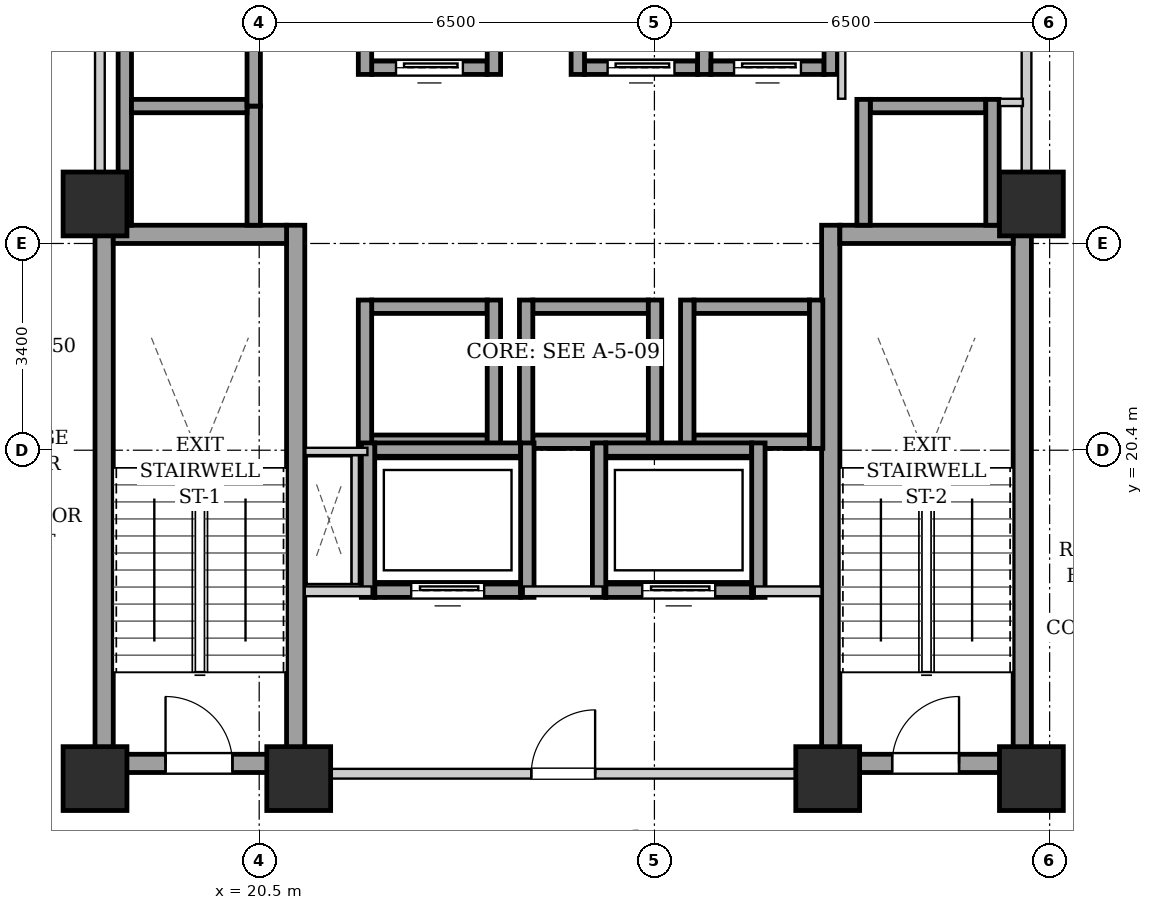
"""IFC4 building model, lengths in metres.
Left out: names, types, materials, properties, quantities, classifications, styles, units other than length and angle.
Written with IfcOpenShell. Run it as: python <this file> out.ifc"""

import sys

from ifc_helpers import new_model, si_unit, direction, frame, frame_2d, origin, origin_2d, place, context, subcontext, project, spatial, rectangle, extrude, element, fill, save


model = new_model("IFC4")
c1 = context("Model", 3, precision=1e-05, world=origin(), true_north=direction((0.0, 1.0)))
c2 = subcontext(c1, "Body", "Model", "MODEL_VIEW")
j1 = project(units=[si_unit("LENGTHUNIT", "METRE"), si_unit("PLANEANGLEUNIT", "RADIAN")], contexts=[c1])
p1 = place(None, origin())
s1 = spatial("IfcSite", under=j1, at=p1, CompositionType="ELEMENT")
p2 = place(p1, origin())
s2 = spatial("IfcBuilding", under=s1, at=p2, CompositionType="ELEMENT")
p3 = place(p2, frame((0.0, 0.0, 119.9)))
s3 = spatial("IfcBuildingStorey", under=s2, at=p3, CompositionType="ELEMENT", Elevation=119.9)
for number, where, z_axis, x_axis in (
    (1, (17.8, 15.0, 0.0), (0.0, 0.0, 1.0), (1.0, 0.0, 0.0)),
    (2, (21.15, 15.0, 0.0), (0.0, 0.0, 1.0), (1.0, 0.0, 0.0)),
    (3, (29.85, 15.0, 0.0), (0.0, 0.0, 1.0), (1.0, 0.0, 0.0)),
    (4, (33.2, 15.0, 0.0), (0.0, 0.0, 1.0), (1.0, 0.0, 0.0)),
    (5, (17.8, 24.45, 0.0), (0.0, 0.0, 1.0), (1.0, 0.0, 0.0)),
    (6, (33.2, 24.45, 0.0), (0.0, 0.0, 1.0), (1.0, 0.0, 0.0)),
):
    element("IfcColumn", number, at=place(p3, frame(where, z_axis=z_axis, x_axis=x_axis)), inside=s3, PredefinedType="COLUMN", context=c2, shape_type="SweptSolid", body=[
        extrude(rectangle(XDim=1.05, YDim=1.05, at=origin_2d()), origin(), (0.0, 0.0, 1.0), 4.5),
    ])
for number, where, z_axis, x_axis in (
    (7, (17.95, 15.1, 0.0), (0.0, 0.0, 1.0), (0.0, 1.0, 0.0)),
    (8, (21.1, 15.1, 0.0), (0.0, 0.0, 1.0), (0.0, 1.0, 0.0)),
):
    element("IfcWall", number, at=place(p3, frame(where, z_axis=z_axis, x_axis=x_axis)), inside=s3, PredefinedType="SHEAR", context=c2, shape_type="SweptSolid", body=[
        extrude(rectangle(XDim=9.0, YDim=0.3, at=frame_2d((4.5, 0.0))), origin(), (0.0, 0.0, 1.0), 4.18),
    ])
p4 = place(p3, frame((18.1, 23.95, 0.0), z_axis=(0.0, 0.0, 1.0), x_axis=(1.0, 0.0, 0.0)))
e9 = element("IfcWall", 9, at=p4, inside=s3, PredefinedType="SHEAR", context=c2, shape_type="SweptSolid", body=[
    extrude(rectangle(XDim=2.85, YDim=0.3, at=frame_2d((1.425, 0.0))), origin(), (0.0, 0.0, 1.0), 4.18),
])
p5 = place(p3, frame((18.1, 15.25, 0.0), z_axis=(0.0, 0.0, 1.0), x_axis=(1.0, 0.0, 0.0)))
e10 = element("IfcWall", 10, at=p5, inside=s3, PredefinedType="SHEAR", context=c2, shape_type="SweptSolid", body=[
    extrude(rectangle(XDim=2.85, YDim=0.3, at=frame_2d((1.425, 0.0))), origin(), (0.0, 0.0, 1.0), 4.18),
])
p6 = place(p5, frame((0.86, 0.0, 0.0)))
e11 = element("IfcOpeningElement", 11, at=p6, cuts=e10, PredefinedType="OPENING", context=c2, shape_type="SweptSolid", body=[
    extrude(rectangle(XDim=1.1, YDim=2.05, at=frame_2d((0.55, 1.025))), frame((0.0, 0.16, 0.0), z_axis=(0.0, -1.0, 0.0), x_axis=(1.0, 0.0, 0.0)), (0.0, 0.0, 1.0), 0.32),
])
for number, where, z_axis, x_axis in (
    (12, (29.9, 15.1, 0.0), (0.0, 0.0, 1.0), (0.0, 1.0, 0.0)),
    (13, (33.05, 15.1, 0.0), (0.0, 0.0, 1.0), (0.0, 1.0, 0.0)),
):
    element("IfcWall", number, at=place(p3, frame(where, z_axis=z_axis, x_axis=x_axis)), inside=s3, PredefinedType="SHEAR", context=c2, shape_type="SweptSolid", body=[
        extrude(rectangle(XDim=9.0, YDim=0.3, at=frame_2d((4.5, 0.0))), origin(), (0.0, 0.0, 1.0), 4.18),
    ])
p7 = place(p3, frame((30.05, 23.95, 0.0), z_axis=(0.0, 0.0, 1.0), x_axis=(1.0, 0.0, 0.0)))
e14 = element("IfcWall", 14, at=p7, inside=s3, PredefinedType="SHEAR", context=c2, shape_type="SweptSolid", body=[
    extrude(rectangle(XDim=2.85, YDim=0.3, at=frame_2d((1.425, 0.0))), origin(), (0.0, 0.0, 1.0), 4.18),
])
p8 = place(p3, frame((30.05, 15.25, 0.0), z_axis=(0.0, 0.0, 1.0), x_axis=(1.0, 0.0, 0.0)))
e15 = element("IfcWall", 15, at=p8, inside=s3, PredefinedType="SHEAR", context=c2, shape_type="SweptSolid", body=[
    extrude(rectangle(XDim=2.85, YDim=0.3, at=frame_2d((1.425, 0.0))), origin(), (0.0, 0.0, 1.0), 4.18),
])
p9 = place(p8, frame((0.86, 0.0, 0.0)))
e16 = element("IfcOpeningElement", 16, at=p9, cuts=e15, PredefinedType="OPENING", context=c2, shape_type="SweptSolid", body=[
    extrude(rectangle(XDim=1.1, YDim=2.05, at=frame_2d((0.55, 1.025))), frame((0.0, 0.16, 0.0), z_axis=(0.0, -1.0, 0.0), x_axis=(1.0, 0.0, 0.0)), (0.0, 0.0, 1.0), 0.32),
])
p10 = place(p3, frame((22.35, 26.69, 0.0), z_axis=(0.0, 0.0, 1.0), x_axis=(1.0, 0.0, 0.0)))
e17 = element("IfcWall", 17, at=p10, inside=s3, PredefinedType="SHEAR", context=c2, shape_type="SweptSolid", body=[
    extrude(rectangle(XDim=1.9, YDim=0.22, at=frame_2d((0.95, 0.0))), origin(), (0.0, 0.0, 1.0), 4.18),
])
p11 = place(p10, frame((0.4, 0.0, 0.0)))
e18 = element("IfcOpeningElement", 18, at=p11, cuts=e17, PredefinedType="OPENING", context=c2, shape_type="SweptSolid", body=[
    extrude(rectangle(XDim=1.1, YDim=2.15, at=frame_2d((0.55, 1.075))), frame((0.0, 0.12, 0.0), z_axis=(0.0, -1.0, 0.0), x_axis=(1.0, 0.0, 0.0)), (0.0, 0.0, 1.0), 0.24),
])
for number, where, z_axis, x_axis in (
    (19, (22.24, 26.58, 0.0), (0.0, 0.0, 1.0), (0.0, 1.0, 0.0)),
    (20, (24.36, 26.58, 0.0), (0.0, 0.0, 1.0), (0.0, 1.0, 0.0)),
):
    element("IfcWall", number, at=place(p3, frame(where, z_axis=z_axis, x_axis=x_axis)), inside=s3, PredefinedType="SHEAR", context=c2, shape_type="SweptSolid", body=[
        extrude(rectangle(XDim=2.44, YDim=0.22, at=frame_2d((1.22, 0.0))), origin(), (0.0, 0.0, 1.0), 4.18),
    ])
p12 = place(p3, frame((25.85, 26.69, 0.0), z_axis=(0.0, 0.0, 1.0), x_axis=(1.0, 0.0, 0.0)))
e21 = element("IfcWall", 21, at=p12, inside=s3, PredefinedType="SHEAR", context=c2, shape_type="SweptSolid", body=[
    extrude(rectangle(XDim=1.86, YDim=0.22, at=frame_2d((0.93, 0.0))), origin(), (0.0, 0.0, 1.0), 4.18),
])
p13 = place(p12, frame((0.38, 0.0, 0.0)))
e22 = element("IfcOpeningElement", 22, at=p13, cuts=e21, PredefinedType="OPENING", context=c2, shape_type="SweptSolid", body=[
    extrude(rectangle(XDim=1.1, YDim=2.15, at=frame_2d((0.55, 1.075))), frame((0.0, 0.12, 0.0), z_axis=(0.0, -1.0, 0.0), x_axis=(1.0, 0.0, 0.0)), (0.0, 0.0, 1.0), 0.24),
])
for number, where, z_axis, x_axis in (
    (23, (25.74, 26.58, 0.0), (0.0, 0.0, 1.0), (0.0, 1.0, 0.0)),
    (24, (27.82, 26.58, 0.0), (0.0, 0.0, 1.0), (0.0, 1.0, 0.0)),
):
    element("IfcWall", number, at=place(p3, frame(where, z_axis=z_axis, x_axis=x_axis)), inside=s3, PredefinedType="SHEAR", context=c2, shape_type="SweptSolid", body=[
        extrude(rectangle(XDim=2.44, YDim=0.22, at=frame_2d((1.22, 0.0))), origin(), (0.0, 0.0, 1.0), 4.18),
    ])
p14 = place(p3, frame((27.93, 26.69, 0.0), z_axis=(0.0, 0.0, 1.0), x_axis=(1.0, 0.0, 0.0)))
e25 = element("IfcWall", 25, at=p14, inside=s3, PredefinedType="SHEAR", context=c2, shape_type="SweptSolid", body=[
    extrude(rectangle(XDim=1.86, YDim=0.22, at=frame_2d((0.93, 0.0))), origin(), (0.0, 0.0, 1.0), 4.18),
])
p15 = place(p14, frame((0.38, 0.0, 0.0)))
e26 = element("IfcOpeningElement", 26, at=p15, cuts=e25, PredefinedType="OPENING", context=c2, shape_type="SweptSolid", body=[
    extrude(rectangle(XDim=1.1, YDim=2.15, at=frame_2d((0.55, 1.075))), frame((0.0, 0.12, 0.0), z_axis=(0.0, -1.0, 0.0), x_axis=(1.0, 0.0, 0.0)), (0.0, 0.0, 1.0), 0.24),
])
p16 = place(p3, frame((29.9, 26.58, 0.0), z_axis=(0.0, 0.0, 1.0), x_axis=(0.0, 1.0, 0.0)))
e27 = element("IfcWall", 27, at=p16, inside=s3, PredefinedType="SHEAR", context=c2, shape_type="SweptSolid", body=[
    extrude(rectangle(XDim=2.44, YDim=0.22, at=frame_2d((1.22, 0.0))), origin(), (0.0, 0.0, 1.0), 4.18),
])
for number, where, z_axis, x_axis in (
    (28, (22.35, 20.54, 0.0), (0.0, 0.0, 1.0), (1.0, 0.0, 0.0)),
    (29, (22.35, 22.76, 0.0), (0.0, 0.0, 1.0), (1.0, 0.0, 0.0)),
):
    element("IfcWall", number, at=place(p3, frame(where, z_axis=z_axis, x_axis=x_axis)), inside=s3, PredefinedType="SHEAR", context=c2, shape_type="SweptSolid", body=[
        extrude(rectangle(XDim=1.9, YDim=0.22, at=frame_2d((0.95, 0.0))), origin(), (0.0, 0.0, 1.0), 4.18),
    ])
for number, where, z_axis, x_axis in (
    (30, (22.24, 20.43, 0.0), (0.0, 0.0, 1.0), (0.0, 1.0, 0.0)),
    (31, (24.36, 20.43, 0.0), (0.0, 0.0, 1.0), (0.0, 1.0, 0.0)),
):
    element("IfcWall", number, at=place(p3, frame(where, z_axis=z_axis, x_axis=x_axis)), inside=s3, PredefinedType="SHEAR", context=c2, shape_type="SweptSolid", body=[
        extrude(rectangle(XDim=2.44, YDim=0.22, at=frame_2d((1.22, 0.0))), origin(), (0.0, 0.0, 1.0), 4.18),
    ])
for number, where, z_axis, x_axis in (
    (32, (25.0, 20.54, 0.0), (0.0, 0.0, 1.0), (1.0, 0.0, 0.0)),
    (33, (25.0, 22.76, 0.0), (0.0, 0.0, 1.0), (1.0, 0.0, 0.0)),
):
    element("IfcWall", number, at=place(p3, frame(where, z_axis=z_axis, x_axis=x_axis)), inside=s3, PredefinedType="SHEAR", context=c2, shape_type="SweptSolid", body=[
        extrude(rectangle(XDim=1.9, YDim=0.22, at=frame_2d((0.95, 0.0))), origin(), (0.0, 0.0, 1.0), 4.18),
    ])
for number, where, z_axis, x_axis in (
    (34, (24.89, 20.43, 0.0), (0.0, 0.0, 1.0), (0.0, 1.0, 0.0)),
    (35, (27.01, 20.43, 0.0), (0.0, 0.0, 1.0), (0.0, 1.0, 0.0)),
):
    element("IfcWall", number, at=place(p3, frame(where, z_axis=z_axis, x_axis=x_axis)), inside=s3, PredefinedType="SHEAR", context=c2, shape_type="SweptSolid", body=[
        extrude(rectangle(XDim=2.44, YDim=0.22, at=frame_2d((1.22, 0.0))), origin(), (0.0, 0.0, 1.0), 4.18),
    ])
for number, where, z_axis, x_axis in (
    (36, (27.65, 20.54, 0.0), (0.0, 0.0, 1.0), (1.0, 0.0, 0.0)),
    (37, (27.65, 22.76, 0.0), (0.0, 0.0, 1.0), (1.0, 0.0, 0.0)),
):
    element("IfcWall", number, at=place(p3, frame(where, z_axis=z_axis, x_axis=x_axis)), inside=s3, PredefinedType="SHEAR", context=c2, shape_type="SweptSolid", body=[
        extrude(rectangle(XDim=1.9, YDim=0.22, at=frame_2d((0.95, 0.0))), origin(), (0.0, 0.0, 1.0), 4.18),
    ])
for number, where, z_axis, x_axis in (
    (38, (27.54, 20.43, 0.0), (0.0, 0.0, 1.0), (0.0, 1.0, 0.0)),
    (39, (29.66, 20.43, 0.0), (0.0, 0.0, 1.0), (0.0, 1.0, 0.0)),
):
    element("IfcWall", number, at=place(p3, frame(where, z_axis=z_axis, x_axis=x_axis)), inside=s3, PredefinedType="SHEAR", context=c2, shape_type="SweptSolid", body=[
        extrude(rectangle(XDim=2.44, YDim=0.22, at=frame_2d((1.22, 0.0))), origin(), (0.0, 0.0, 1.0), 4.18),
    ])
p17 = place(p3, frame((18.29, 24.1, 0.0), z_axis=(0.0, 0.0, 1.0), x_axis=(0.0, 1.0, 0.0)))
e40 = element("IfcWall", 40, at=p17, inside=s3, PredefinedType="SHEAR", context=c2, shape_type="SweptSolid", body=[
    extrude(rectangle(XDim=4.14, YDim=0.22, at=frame_2d((2.07, 0.0))), origin(), (0.0, 0.0, 1.0), 4.18),
])
p18 = place(p3, frame((20.41, 24.1, 0.0), z_axis=(0.0, 0.0, 1.0), x_axis=(0.0, 1.0, 0.0)))
e41 = element("IfcWall", 41, at=p18, inside=s3, PredefinedType="SHEAR", context=c2, shape_type="SweptSolid", body=[
    extrude(rectangle(XDim=1.96, YDim=0.22, at=frame_2d((0.98, 0.0))), origin(), (0.0, 0.0, 1.0), 4.18),
])
p19 = place(p3, frame((18.4, 26.06, 0.0), z_axis=(0.0, 0.0, 1.0), x_axis=(1.0, 0.0, 0.0)))
e42 = element("IfcWall", 42, at=p19, inside=s3, PredefinedType="SHEAR", context=c2, shape_type="SweptSolid", body=[
    extrude(rectangle(XDim=1.9, YDim=0.22, at=frame_2d((0.95, 0.0))), origin(), (0.0, 0.0, 1.0), 4.18),
])
p20 = place(p3, frame((20.41, 26.06, 0.0), z_axis=(0.0, 0.0, 1.0), x_axis=(0.0, 1.0, 0.0)))
e43 = element("IfcWall", 43, at=p20, inside=s3, PredefinedType="SHEAR", context=c2, shape_type="SweptSolid", body=[
    extrude(rectangle(XDim=2.18, YDim=0.22, at=frame_2d((1.09, 0.0))), origin(), (0.0, 0.0, 1.0), 4.18),
])
p21 = place(p3, frame((30.55, 26.06, 0.0), z_axis=(0.0, 0.0, 1.0), x_axis=(1.0, 0.0, 0.0)))
e44 = element("IfcWall", 44, at=p21, inside=s3, PredefinedType="SHEAR", context=c2, shape_type="SweptSolid", body=[
    extrude(rectangle(XDim=1.9, YDim=0.22, at=frame_2d((0.95, 0.0))), origin(), (0.0, 0.0, 1.0), 4.18),
])
for number, where, z_axis, x_axis in (
    (45, (30.44, 24.1, 0.0), (0.0, 0.0, 1.0), (0.0, 1.0, 0.0)),
    (46, (32.56, 24.1, 0.0), (0.0, 0.0, 1.0), (0.0, 1.0, 0.0)),
):
    element("IfcWall", number, at=place(p3, frame(where, z_axis=z_axis, x_axis=x_axis)), inside=s3, PredefinedType="SHEAR", context=c2, shape_type="SweptSolid", body=[
        extrude(rectangle(XDim=2.07, YDim=0.22, at=frame_2d((1.035, 0.0))), origin(), (0.0, 0.0, 1.0), 4.18),
    ])
p22 = place(p3, frame((22.4, 18.09, 0.0), z_axis=(0.0, 0.0, 1.0), x_axis=(1.0, 0.0, 0.0)))
e47 = element("IfcWall", 47, at=p22, inside=s3, PredefinedType="SHEAR", context=c2, shape_type="SweptSolid", body=[
    extrude(rectangle(XDim=2.4, YDim=0.22, at=frame_2d((1.2, 0.0))), origin(), (0.0, 0.0, 1.0), 4.18),
])
p23 = place(p22, frame((0.6, 0.0, 0.0)))
e48 = element("IfcOpeningElement", 48, at=p23, cuts=e47, PredefinedType="OPENING", context=c2, shape_type="SweptSolid", body=[
    extrude(rectangle(XDim=1.2, YDim=2.15, at=frame_2d((0.6, 1.075))), frame((0.0, 0.12, 0.0), z_axis=(0.0, -1.0, 0.0), x_axis=(1.0, 0.0, 0.0)), (0.0, 0.0, 1.0), 0.24),
])
p24 = place(p3, frame((22.4, 20.41, 0.0), z_axis=(0.0, 0.0, 1.0), x_axis=(1.0, 0.0, 0.0)))
e49 = element("IfcWall", 49, at=p24, inside=s3, PredefinedType="SHEAR", context=c2, shape_type="SweptSolid", body=[
    extrude(rectangle(XDim=2.4, YDim=0.22, at=frame_2d((1.2, 0.0))), origin(), (0.0, 0.0, 1.0), 4.18),
])
for number, where, z_axis, x_axis in (
    (50, (22.29, 17.98, 0.0), (0.0, 0.0, 1.0), (0.0, 1.0, 0.0)),
    (51, (24.91, 17.98, 0.0), (0.0, 0.0, 1.0), (0.0, 1.0, 0.0)),
):
    element("IfcWall", number, at=place(p3, frame(where, z_axis=z_axis, x_axis=x_axis)), inside=s3, PredefinedType="SHEAR", context=c2, shape_type="SweptSolid", body=[
        extrude(rectangle(XDim=2.54, YDim=0.22, at=frame_2d((1.27, 0.0))), origin(), (0.0, 0.0, 1.0), 4.18),
    ])
p25 = place(p3, frame((26.2, 18.09, 0.0), z_axis=(0.0, 0.0, 1.0), x_axis=(1.0, 0.0, 0.0)))
e52 = element("IfcWall", 52, at=p25, inside=s3, PredefinedType="SHEAR", context=c2, shape_type="SweptSolid", body=[
    extrude(rectangle(XDim=2.4, YDim=0.22, at=frame_2d((1.2, 0.0))), origin(), (0.0, 0.0, 1.0), 4.18),
])
p26 = place(p25, frame((0.6, 0.0, 0.0)))
e53 = element("IfcOpeningElement", 53, at=p26, cuts=e52, PredefinedType="OPENING", context=c2, shape_type="SweptSolid", body=[
    extrude(rectangle(XDim=1.2, YDim=2.15, at=frame_2d((0.6, 1.075))), frame((0.0, 0.12, 0.0), z_axis=(0.0, -1.0, 0.0), x_axis=(1.0, 0.0, 0.0)), (0.0, 0.0, 1.0), 0.24),
])
p27 = place(p3, frame((26.2, 20.41, 0.0), z_axis=(0.0, 0.0, 1.0), x_axis=(1.0, 0.0, 0.0)))
e54 = element("IfcWall", 54, at=p27, inside=s3, PredefinedType="SHEAR", context=c2, shape_type="SweptSolid", body=[
    extrude(rectangle(XDim=2.4, YDim=0.22, at=frame_2d((1.2, 0.0))), origin(), (0.0, 0.0, 1.0), 4.18),
])
for number, where, z_axis, x_axis in (
    (55, (26.09, 17.98, 0.0), (0.0, 0.0, 1.0), (0.0, 1.0, 0.0)),
    (56, (28.71, 17.98, 0.0), (0.0, 0.0, 1.0), (0.0, 1.0, 0.0)),
):
    element("IfcWall", number, at=place(p3, frame(where, z_axis=z_axis, x_axis=x_axis)), inside=s3, PredefinedType="SHEAR", context=c2, shape_type="SweptSolid", body=[
        extrude(rectangle(XDim=2.54, YDim=0.22, at=frame_2d((1.27, 0.0))), origin(), (0.0, 0.0, 1.0), 4.18),
    ])
p28 = place(p3, frame((21.25, 15.08, 0.0), z_axis=(0.0, 0.0, 1.0), x_axis=(1.0, 0.0, 0.0)))
e57 = element("IfcWall", 57, at=p28, inside=s3, PredefinedType="PARTITIONING", context=c2, shape_type="SweptSolid", body=[
    extrude(rectangle(XDim=8.5, YDim=0.16, at=frame_2d((4.25, 0.0))), origin(), (0.0, 0.0, 1.0), 4.18),
])
p29 = place(p28, frame((3.725, 0.0, 0.0)))
e58 = element("IfcOpeningElement", 58, at=p29, cuts=e57, PredefinedType="OPENING", context=c2, shape_type="SweptSolid", body=[
    extrude(rectangle(XDim=1.05, YDim=2.05, at=frame_2d((0.525, 1.025))), frame((0.0, 0.09, 0.0), z_axis=(0.0, -1.0, 0.0), x_axis=(1.0, 0.0, 0.0)), (0.0, 0.0, 1.0), 0.18),
])
p30 = place(p3, frame((21.25, 18.08, 0.0), z_axis=(0.0, 0.0, 1.0), x_axis=(1.0, 0.0, 0.0)))
e59 = element("IfcWall", 59, at=p30, inside=s3, PredefinedType="PARTITIONING", context=c2, shape_type="SweptSolid", body=[
    extrude(rectangle(XDim=1.1, YDim=0.16, at=frame_2d((0.55, 0.0))), origin(), (0.0, 0.0, 1.0), 4.18),
])
p31 = place(p3, frame((24.85, 18.08, 0.0), z_axis=(0.0, 0.0, 1.0), x_axis=(1.0, 0.0, 0.0)))
e60 = element("IfcWall", 60, at=p31, inside=s3, PredefinedType="PARTITIONING", context=c2, shape_type="SweptSolid", body=[
    extrude(rectangle(XDim=1.3, YDim=0.16, at=frame_2d((0.65, 0.0))), origin(), (0.0, 0.0, 1.0), 4.18),
])
p32 = place(p3, frame((28.65, 18.08, 0.0), z_axis=(0.0, 0.0, 1.0), x_axis=(1.0, 0.0, 0.0)))
e61 = element("IfcWall", 61, at=p32, inside=s3, PredefinedType="PARTITIONING", context=c2, shape_type="SweptSolid", body=[
    extrude(rectangle(XDim=1.1, YDim=0.16, at=frame_2d((0.55, 0.0))), origin(), (0.0, 0.0, 1.0), 4.18),
])
for number, where, z_axis, x_axis in (
    (62, (17.88, 24.12, 0.0), (0.0, 0.0, 1.0), (0.0, 1.0, 0.0)),
    (63, (33.12, 24.12, 0.0), (0.0, 0.0, 1.0), (0.0, 1.0, 0.0)),
):
    element("IfcWall", number, at=place(p3, frame(where, z_axis=z_axis, x_axis=x_axis)), inside=s3, PredefinedType="PARTITIONING", context=c2, shape_type="SweptSolid", body=[
        extrude(rectangle(XDim=4.76, YDim=0.16, at=frame_2d((2.38, 0.0))), origin(), (0.0, 0.0, 1.0), 4.18),
    ])
p33 = place(p3, frame((22.08, 18.2, 0.0), z_axis=(0.0, 0.0, 1.0), x_axis=(0.0, 1.0, 0.0)))
e64 = element("IfcWall", 64, at=p33, inside=s3, PredefinedType="PARTITIONING", context=c2, shape_type="SweptSolid", body=[
    extrude(rectangle(XDim=2.12, YDim=0.12, at=frame_2d((1.06, 0.0))), origin(), (0.0, 0.0, 1.0), 4.18),
])
p34 = place(p3, frame((22.28, 20.38, 0.0), z_axis=(0.0, 0.0, 1.0), x_axis=(-1.0, 0.0, 0.0)))
e65 = element("IfcWall", 65, at=p34, inside=s3, PredefinedType="PARTITIONING", context=c2, shape_type="SweptSolid", body=[
    extrude(rectangle(XDim=1.02, YDim=0.12, at=frame_2d((0.51, 0.0))), origin(), (0.0, 0.0, 1.0), 4.18),
])
p35 = place(p3, frame((30.08, 26.18, 0.0), z_axis=(0.0, 0.0, 1.0), x_axis=(0.0, 1.0, 0.0)))
e66 = element("IfcWall", 66, at=p35, inside=s3, PredefinedType="PARTITIONING", context=c2, shape_type="SweptSolid", body=[
    extrude(rectangle(XDim=2.68, YDim=0.12, at=frame_2d((1.34, 0.0))), origin(), (0.0, 0.0, 1.0), 4.18),
])
p36 = place(p3, frame((32.68, 26.12, 0.0), z_axis=(0.0, 0.0, 1.0), x_axis=(1.0, 0.0, 0.0)))
e67 = element("IfcWall", 67, at=p36, inside=s3, PredefinedType="PARTITIONING", context=c2, shape_type="SweptSolid", body=[
    extrude(rectangle(XDim=0.38, YDim=0.12, at=frame_2d((0.19, 0.0))), origin(), (0.0, 0.0, 1.0), 4.18),
])
p37 = place(p6, origin())
e68 = element("IfcDoor", 68, at=p37, inside=s3, OperationType="SINGLE_SWING_LEFT", PredefinedType="DOOR", context=c2, shape_type="SweptSolid", body=[
    extrude(rectangle(XDim=1.1, YDim=2.05, at=frame_2d((0.55, 1.025))), frame((0.0, 0.025, 0.0), z_axis=(0.0, -1.0, 0.0), x_axis=(1.0, 0.0, 0.0)), (0.0, 0.0, 1.0), 0.05),
])
fill(e11, e68)
p38 = place(p9, origin())
e69 = element("IfcDoor", 69, at=p38, inside=s3, OperationType="SINGLE_SWING_RIGHT", PredefinedType="DOOR", context=c2, shape_type="SweptSolid", body=[
    extrude(rectangle(XDim=1.1, YDim=2.05, at=frame_2d((0.55, 1.025))), frame((0.0, 0.025, 0.0), z_axis=(0.0, -1.0, 0.0), x_axis=(1.0, 0.0, 0.0)), (0.0, 0.0, 1.0), 0.05),
])
fill(e16, e69)
p39 = place(p11, origin())
e70 = element("IfcDoor", 70, at=p39, inside=s3, OperationType="SLIDING_TO_LEFT", PredefinedType="DOOR", context=c2, shape_type="SweptSolid", body=[
    extrude(rectangle(XDim=1.1, YDim=2.15, at=frame_2d((0.55, 1.075))), frame((0.0, 0.025, 0.0), z_axis=(0.0, -1.0, 0.0), x_axis=(1.0, 0.0, 0.0)), (0.0, 0.0, 1.0), 0.05),
])
fill(e18, e70)
p40 = place(p13, origin())
e71 = element("IfcDoor", 71, at=p40, inside=s3, OperationType="SLIDING_TO_LEFT", PredefinedType="DOOR", context=c2, shape_type="SweptSolid", body=[
    extrude(rectangle(XDim=1.1, YDim=2.15, at=frame_2d((0.55, 1.075))), frame((0.0, 0.025, 0.0), z_axis=(0.0, -1.0, 0.0), x_axis=(1.0, 0.0, 0.0)), (0.0, 0.0, 1.0), 0.05),
])
fill(e22, e71)
p41 = place(p15, origin())
e72 = element("IfcDoor", 72, at=p41, inside=s3, OperationType="SLIDING_TO_LEFT", PredefinedType="DOOR", context=c2, shape_type="SweptSolid", body=[
    extrude(rectangle(XDim=1.1, YDim=2.15, at=frame_2d((0.55, 1.075))), frame((0.0, 0.025, 0.0), z_axis=(0.0, -1.0, 0.0), x_axis=(1.0, 0.0, 0.0)), (0.0, 0.0, 1.0), 0.05),
])
fill(e26, e72)
p42 = place(p23, origin())
e73 = element("IfcDoor", 73, at=p42, inside=s3, OperationType="SLIDING_TO_LEFT", PredefinedType="DOOR", context=c2, shape_type="SweptSolid", body=[
    extrude(rectangle(XDim=1.2, YDim=2.15, at=frame_2d((0.6, 1.075))), frame((0.0, 0.025, 0.0), z_axis=(0.0, -1.0, 0.0), x_axis=(1.0, 0.0, 0.0)), (0.0, 0.0, 1.0), 0.05),
])
fill(e48, e73)
p43 = place(p26, origin())
e74 = element("IfcDoor", 74, at=p43, inside=s3, OperationType="SLIDING_TO_LEFT", PredefinedType="DOOR", context=c2, shape_type="SweptSolid", body=[
    extrude(rectangle(XDim=1.2, YDim=2.15, at=frame_2d((0.6, 1.075))), frame((0.0, 0.025, 0.0), z_axis=(0.0, -1.0, 0.0), x_axis=(1.0, 0.0, 0.0)), (0.0, 0.0, 1.0), 0.05),
])
fill(e53, e74)
p44 = place(p29, origin())
e75 = element("IfcDoor", 75, at=p44, inside=s3, OperationType="SINGLE_SWING_RIGHT", PredefinedType="DOOR", context=c2, shape_type="SweptSolid", body=[
    extrude(rectangle(XDim=1.05, YDim=2.05, at=frame_2d((0.525, 1.025))), frame((0.0, 0.025, 0.0), z_axis=(0.0, -1.0, 0.0), x_axis=(1.0, 0.0, 0.0)), (0.0, 0.0, 1.0), 0.05),
])
fill(e58, e75)
save(model, sys.argv[1])
